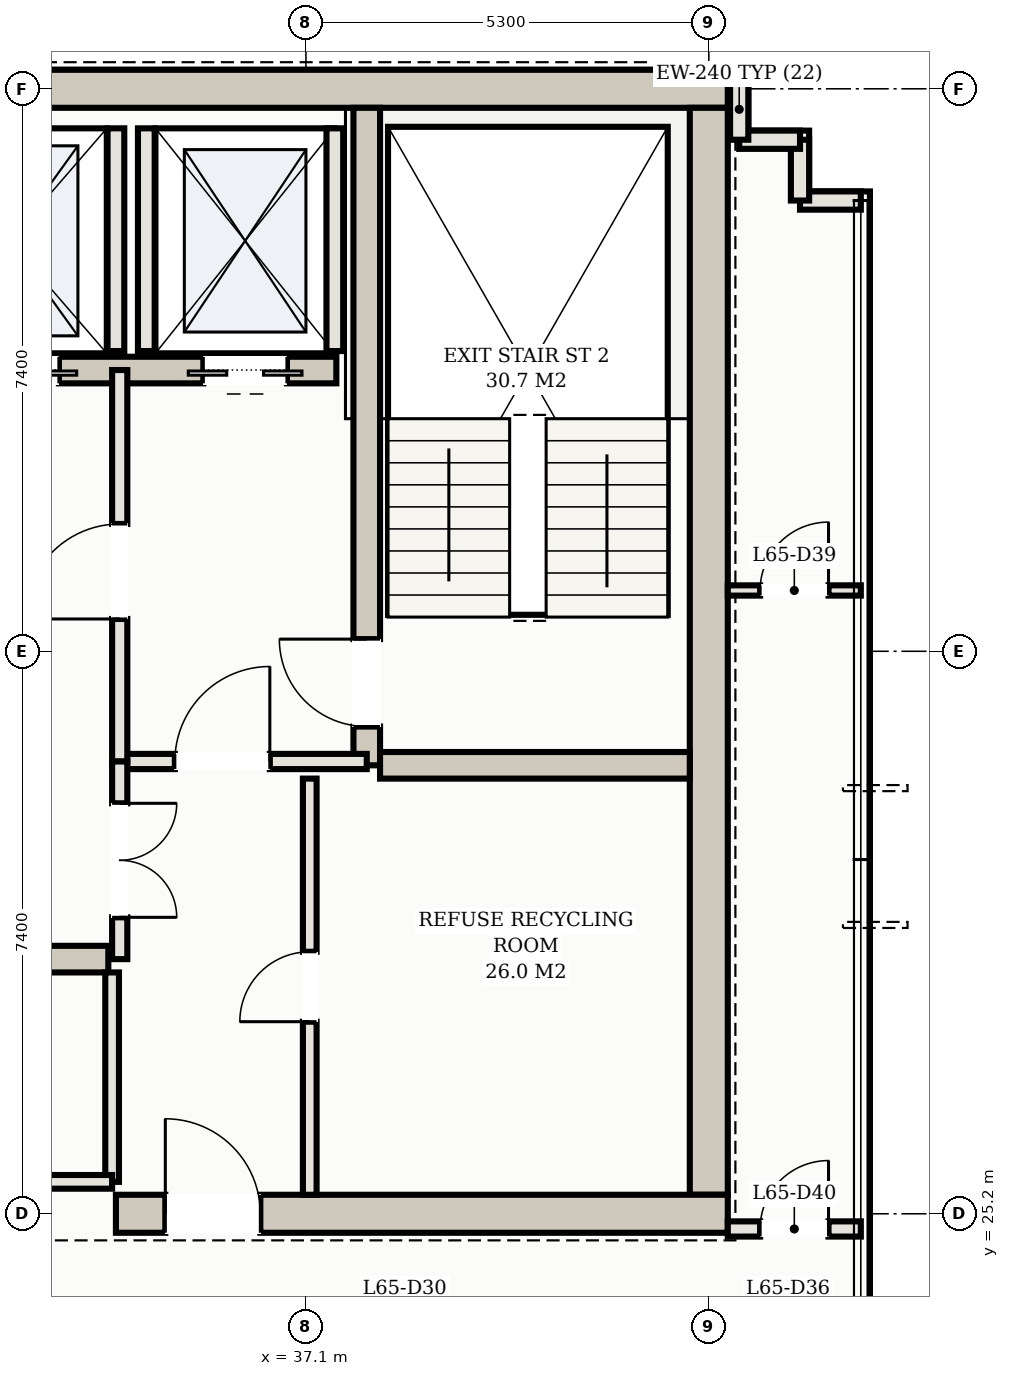
"""IFC4 building model, lengths in metres.
Left out: names, types, materials, properties, quantities, classifications, styles, units other than length and angle.
Written with IfcOpenShell. Run it as: python <this file> out.ifc"""

import sys

from ifc_helpers import new_model, si_unit, direction, frame, frame_2d, origin, place, context, subcontext, project, spatial, rectangle, extrude, element, fill, save


model = new_model("IFC4")
c1 = context("Model", 3, precision=1e-05, world=origin(), true_north=direction((0.0, 1.0)))
c2 = subcontext(c1, "Body", "Model", "MODEL_VIEW")
j1 = project(units=[si_unit("LENGTHUNIT", "METRE"), si_unit("PLANEANGLEUNIT", "RADIAN")], contexts=[c1])
p1 = place(None, origin())
s1 = spatial("IfcSite", under=j1, at=p1, CompositionType="ELEMENT")
p2 = place(p1, origin())
s2 = spatial("IfcBuilding", under=s1, at=p2, CompositionType="ELEMENT")
p3 = place(p2, frame((0.0, 0.0, 236.3)))
s3 = spatial("IfcBuildingStorey", under=s2, at=p3, CompositionType="ELEMENT", Elevation=236.3)
p4 = place(p3, frame((10.35, 40.0, 0.0), z_axis=(0.0, 0.0, 1.0), x_axis=(1.0, 0.0, 0.0)))
e1 = element("IfcWall", 1, at=p4, inside=s3, PredefinedType="SHEAR", context=c2, shape_type="SweptSolid", body=[
    extrude(rectangle(XDim=32.3, YDim=0.5, at=frame_2d((16.15, 0.0))), origin(), (0.0, 0.0, 1.0), 3.11),
])
p5 = place(p3, frame((42.4, 25.45, 0.0), z_axis=(0.0, 0.0, 1.0), x_axis=(0.0, 1.0, 0.0)))
e2 = element("IfcWall", 2, at=p5, inside=s3, PredefinedType="SHEAR", context=c2, shape_type="SweptSolid", body=[
    extrude(rectangle(XDim=14.3, YDim=0.5, at=frame_2d((7.15, 0.0))), origin(), (0.0, 0.0, 1.0), 3.11),
])
p6 = place(p3, frame((34.6, 25.2, 0.0), z_axis=(0.0, 0.0, 1.0), x_axis=(1.0, 0.0, 0.0)))
e3 = element("IfcWall", 3, at=p6, inside=s3, PredefinedType="SHEAR", context=c2, shape_type="SweptSolid", body=[
    extrude(rectangle(XDim=8.05, YDim=0.5, at=frame_2d((4.025, 0.0))), origin(), (0.0, 0.0, 1.0), 3.11),
])
p7 = place(p6, frame((0.65, 0.0, 0.0)))
e4 = element("IfcOpeningElement", 4, at=p7, cuts=e3, PredefinedType="OPENING", context=c2, shape_type="SweptSolid", body=[
    extrude(rectangle(XDim=1.25, YDim=2.2, at=frame_2d((0.625, 1.1))), frame((0.0, 0.26, 0.0), z_axis=(0.0, -1.0, 0.0), x_axis=(1.0, 0.0, 0.0)), (0.0, 0.0, 1.0), 0.52),
])
p8 = place(p3, frame((37.9, 31.1, 0.0), z_axis=(0.0, 0.0, 1.0), x_axis=(0.0, 1.0, 0.0)))
e5 = element("IfcWall", 5, at=p8, inside=s3, PredefinedType="SHEAR", context=c2, shape_type="SweptSolid", body=[
    extrude(rectangle(XDim=8.65, YDim=0.35, at=frame_2d((4.325, 0.0))), origin(), (0.0, 0.0, 1.0), 3.11),
])
p9 = place(p8, frame((0.51, 0.0, 0.0)))
e6 = element("IfcOpeningElement", 6, at=p9, cuts=e5, PredefinedType="OPENING", context=c2, shape_type="SweptSolid", body=[
    extrude(rectangle(XDim=1.15, YDim=2.2, at=frame_2d((0.575, 1.1))), frame((0.0, 0.185, 0.0), z_axis=(0.0, -1.0, 0.0), x_axis=(1.0, 0.0, 0.0)), (0.0, 0.0, 1.0), 0.37),
])
p10 = place(p3, frame((38.075, 31.1, 0.0), z_axis=(0.0, 0.0, 1.0), x_axis=(1.0, 0.0, 0.0)))
e7 = element("IfcWall", 7, at=p10, inside=s3, PredefinedType="SHEAR", context=c2, shape_type="SweptSolid", body=[
    extrude(rectangle(XDim=4.075, YDim=0.35, at=frame_2d((2.038, 0.0))), origin(), (0.0, 0.0, 1.0), 3.11),
])
p11 = place(p3, frame((15.5, 36.3, 0.0), z_axis=(0.0, 0.0, 1.0), x_axis=(1.0, 0.0, 0.0)))
e8 = element("IfcWall", 8, at=p11, inside=s3, PredefinedType="SHEAR", context=c2, shape_type="SweptSolid", body=[
    extrude(rectangle(XDim=22.0, YDim=0.35, at=frame_2d((11.0, 0.0))), origin(), (0.0, 0.0, 1.0), 3.11),
])
p12 = place(p11, frame((0.65, 0.0, 0.0)))
e9 = element("IfcOpeningElement", 9, at=p12, cuts=e8, PredefinedType="OPENING", context=c2, shape_type="SweptSolid", body=[
    extrude(rectangle(XDim=1.1, YDim=2.15, at=frame_2d((0.55, 1.075))), frame((0.0, 0.185, 0.0), z_axis=(0.0, -1.0, 0.0), x_axis=(1.0, 0.0, 0.0)), (0.0, 0.0, 1.0), 0.37),
])
p13 = place(p11, frame((20.25, 0.0, 0.0)))
e10 = element("IfcOpeningElement", 10, at=p13, cuts=e8, PredefinedType="OPENING", context=c2, shape_type="SweptSolid", body=[
    extrude(rectangle(XDim=1.1, YDim=2.15, at=frame_2d((0.55, 1.075))), frame((0.0, 0.185, 0.0), z_axis=(0.0, -1.0, 0.0), x_axis=(1.0, 0.0, 0.0)), (0.0, 0.0, 1.0), 0.37),
])
p14 = place(p11, frame((17.05, 0.0, 0.0)))
e11 = element("IfcOpeningElement", 11, at=p14, cuts=e8, PredefinedType="OPENING", context=c2, shape_type="SweptSolid", body=[
    extrude(rectangle(XDim=1.3, YDim=2.2, at=frame_2d((0.65, 1.1))), frame((0.0, 0.185, 0.0), z_axis=(0.0, -1.0, 0.0), x_axis=(1.0, 0.0, 0.0)), (0.0, 0.0, 1.0), 0.37),
])
p15 = place(p11, frame((3.95, 0.0, 0.0)))
e12 = element("IfcOpeningElement", 12, at=p15, cuts=e8, PredefinedType="OPENING", context=c2, shape_type="SweptSolid", body=[
    extrude(rectangle(XDim=1.1, YDim=2.15, at=frame_2d((0.55, 1.075))), frame((0.0, 0.185, 0.0), z_axis=(0.0, -1.0, 0.0), x_axis=(1.0, 0.0, 0.0)), (0.0, 0.0, 1.0), 0.37),
])
p16 = place(p11, frame((6.55, 0.0, 0.0)))
e13 = element("IfcOpeningElement", 13, at=p16, cuts=e8, PredefinedType="OPENING", context=c2, shape_type="SweptSolid", body=[
    extrude(rectangle(XDim=1.1, YDim=2.15, at=frame_2d((0.55, 1.075))), frame((0.0, 0.185, 0.0), z_axis=(0.0, -1.0, 0.0), x_axis=(1.0, 0.0, 0.0)), (0.0, 0.0, 1.0), 0.37),
])
p17 = place(p11, frame((9.15, 0.0, 0.0)))
e14 = element("IfcOpeningElement", 14, at=p17, cuts=e8, PredefinedType="OPENING", context=c2, shape_type="SweptSolid", body=[
    extrude(rectangle(XDim=1.1, YDim=2.15, at=frame_2d((0.55, 1.075))), frame((0.0, 0.185, 0.0), z_axis=(0.0, -1.0, 0.0), x_axis=(1.0, 0.0, 0.0)), (0.0, 0.0, 1.0), 0.37),
])
p18 = place(p3, frame((18.5, 28.55, 0.0), z_axis=(0.0, 0.0, 1.0), x_axis=(1.0, 0.0, 0.0)))
e15 = element("IfcWall", 15, at=p18, inside=s3, PredefinedType="SHEAR", context=c2, shape_type="SweptSolid", body=[
    extrude(rectangle(XDim=16.0, YDim=0.35, at=frame_2d((8.0, 0.0))), origin(), (0.0, 0.0, 1.0), 3.11),
])
for number, where, z_axis, x_axis in (
    (16, (35.0, 36.55, 0.0), (0.0, 0.0, 1.0), (0.0, 1.0, 0.0)),
    (17, (37.48, 36.55, 0.0), (0.0, 0.0, 1.0), (0.0, 1.0, 0.0)),
    (18, (34.6, 36.55, 0.0), (0.0, 0.0, 1.0), (0.0, 1.0, 0.0)),
):
    element("IfcWall", number, at=place(p3, frame(where, z_axis=z_axis, x_axis=x_axis)), inside=s3, PredefinedType="SOLIDWALL", context=c2, shape_type="SweptSolid", body=[
        extrude(rectangle(XDim=2.93, YDim=0.22, at=frame_2d((1.465, 0.0))), origin(), (0.0, 0.0, 1.0), 3.11),
    ])
p19 = place(p3, frame((44.4, 38.53, 0.0), z_axis=(0.0, 0.0, 1.0), x_axis=(-1.0, 0.0, 0.0)))
e19 = element("IfcWall", 19, at=p19, inside=s3, PredefinedType="SOLIDWALL", context=c2, shape_type="SweptSolid", body=[
    extrude(rectangle(XDim=0.8, YDim=0.24, at=frame_2d((0.4, 0.0))), origin(), (0.0, 0.0, 1.0), 3.11),
])
for number, where, z_axis, x_axis in (
    (20, (43.6, 38.53, 0.0), (0.0, 0.0, 1.0), (0.0, 1.0, 0.0)),
    (21, (43.6, 39.33, 0.0), (0.0, 0.0, 1.0), (-1.0, 0.0, 0.0)),
):
    element("IfcWall", number, at=place(p3, frame(where, z_axis=z_axis, x_axis=x_axis)), inside=s3, PredefinedType="SOLIDWALL", context=c2, shape_type="SweptSolid", body=[
        extrude(rectangle(XDim=0.8, YDim=0.24, at=frame_2d((0.4, 0.0))), origin(), (0.0, 0.0, 1.0), 3.11),
    ])
p20 = place(p3, frame((42.8, 39.33, 0.0), z_axis=(0.0, 0.0, 1.0), x_axis=(0.0, 1.0, 0.0)))
e22 = element("IfcWall", 22, at=p20, inside=s3, PredefinedType="SOLIDWALL", context=c2, shape_type="SweptSolid", body=[
    extrude(rectangle(XDim=0.8, YDim=0.24, at=frame_2d((0.4, 0.0))), origin(), (0.0, 0.0, 1.0), 3.11),
])
p21 = place(p3, frame((34.65, 31.15, 0.0), z_axis=(0.0, 0.0, 1.0), x_axis=(1.0, 0.0, 0.0)))
e23 = element("IfcWall", 23, at=p21, inside=s3, PredefinedType="PARTITIONING", context=c2, shape_type="SweptSolid", body=[
    extrude(rectangle(XDim=3.25, YDim=0.2, at=frame_2d((1.625, 0.0))), origin(), (0.0, 0.0, 1.0), 2.45),
])
p22 = place(p21, frame((0.725, 0.0, 0.0)))
e24 = element("IfcOpeningElement", 24, at=p22, cuts=e23, PredefinedType="OPENING", context=c2, shape_type="SweptSolid", body=[
    extrude(rectangle(XDim=1.25, YDim=2.2, at=frame_2d((0.625, 1.1))), frame((0.0, 0.11, 0.0), z_axis=(0.0, -1.0, 0.0), x_axis=(1.0, 0.0, 0.0)), (0.0, 0.0, 1.0), 0.22),
])
p23 = place(p3, frame((34.65, 31.15, 0.0), z_axis=(0.0, 0.0, 1.0), x_axis=(0.0, 1.0, 0.0)))
e25 = element("IfcWall", 25, at=p23, inside=s3, PredefinedType="PARTITIONING", context=c2, shape_type="SweptSolid", body=[
    extrude(rectangle(XDim=5.15, YDim=0.2, at=frame_2d((2.575, 0.0))), origin(), (0.0, 0.0, 1.0), 2.45),
])
p24 = place(p23, frame((1.875, 0.0, 0.0)))
e26 = element("IfcOpeningElement", 26, at=p24, cuts=e25, PredefinedType="OPENING", context=c2, shape_type="SweptSolid", body=[
    extrude(rectangle(XDim=1.25, YDim=2.2, at=frame_2d((0.625, 1.1))), frame((0.0, 0.11, 0.0), z_axis=(0.0, -1.0, 0.0), x_axis=(1.0, 0.0, 0.0)), (0.0, 0.0, 1.0), 0.22),
])
p25 = place(p3, frame((37.15, 25.45, 0.0), z_axis=(0.0, 0.0, 1.0), x_axis=(0.0, 1.0, 0.0)))
e27 = element("IfcWall", 27, at=p25, inside=s3, PredefinedType="PARTITIONING", context=c2, shape_type="SweptSolid", body=[
    extrude(rectangle(XDim=5.475, YDim=0.18, at=frame_2d((2.738, 0.0))), origin(), (0.0, 0.0, 1.0), 2.45),
])
p26 = place(p25, frame((2.277, 0.0, 0.0)))
e28 = element("IfcOpeningElement", 28, at=p26, cuts=e27, PredefinedType="OPENING", context=c2, shape_type="SweptSolid", body=[
    extrude(rectangle(XDim=0.92, YDim=2.15, at=frame_2d((0.46, 1.075))), frame((0.0, 0.1, 0.0), z_axis=(0.0, -1.0, 0.0), x_axis=(1.0, 0.0, 0.0)), (0.0, 0.0, 1.0), 0.2),
])
p27 = place(p3, frame((34.65, 28.55, 0.0), z_axis=(0.0, 0.0, 1.0), x_axis=(0.0, 1.0, 0.0)))
e29 = element("IfcWall", 29, at=p27, inside=s3, PredefinedType="PARTITIONING", context=c2, shape_type="SweptSolid", body=[
    extrude(rectangle(XDim=2.6, YDim=0.2, at=frame_2d((1.3, 0.0))), origin(), (0.0, 0.0, 1.0), 2.45),
])
p28 = place(p27, frame((0.55, 0.0, 0.0)))
e30 = element("IfcOpeningElement", 30, at=p28, cuts=e29, PredefinedType="OPENING", context=c2, shape_type="SweptSolid", body=[
    extrude(rectangle(XDim=1.5, YDim=2.25, at=frame_2d((0.75, 1.125))), frame((0.0, 0.11, 0.0), z_axis=(0.0, -1.0, 0.0), x_axis=(1.0, 0.0, 0.0)), (0.0, 0.0, 1.0), 0.22),
])
p29 = place(p3, frame((34.55, 25.62, 0.0), z_axis=(0.0, 0.0, 1.0), x_axis=(0.0, 1.0, 0.0)))
e31 = element("IfcWall", 31, at=p29, inside=s3, PredefinedType="PARTITIONING", context=c2, shape_type="SweptSolid", body=[
    extrude(rectangle(XDim=2.755, YDim=0.18, at=frame_2d((1.377, 0.0))), origin(), (0.0, 0.0, 1.0), 2.45),
])
p30 = place(p3, frame((26.65, 25.62, 0.0), z_axis=(0.0, 0.0, 1.0), x_axis=(1.0, 0.0, 0.0)))
e32 = element("IfcWall", 32, at=p30, inside=s3, PredefinedType="PARTITIONING", context=c2, shape_type="SweptSolid", body=[
    extrude(rectangle(XDim=7.9, YDim=0.18, at=frame_2d((3.95, 0.0))), origin(), (0.0, 0.0, 1.0), 2.45),
])
p31 = place(p30, frame((3.34, 0.0, 0.0)))
e33 = element("IfcOpeningElement", 33, at=p31, cuts=e32, PredefinedType="OPENING", context=c2, shape_type="SweptSolid", body=[
    extrude(rectangle(XDim=0.92, YDim=2.15, at=frame_2d((0.46, 1.075))), frame((0.0, 0.1, 0.0), z_axis=(0.0, -1.0, 0.0), x_axis=(1.0, 0.0, 0.0)), (0.0, 0.0, 1.0), 0.2),
])
p32 = place(p3, frame((42.65, 25.0, 0.0), z_axis=(0.0, 0.0, 1.0), x_axis=(1.0, 0.0, 0.0)))
e34 = element("IfcWall", 34, at=p32, inside=s3, PredefinedType="PARTITIONING", context=c2, shape_type="SweptSolid", body=[
    extrude(rectangle(XDim=1.75, YDim=0.2, at=frame_2d((0.875, 0.0))), origin(), (0.0, 0.0, 1.0), 2.45),
])
p33 = place(p32, frame((0.425, 0.0, 0.0)))
e35 = element("IfcOpeningElement", 35, at=p33, cuts=e34, PredefinedType="OPENING", context=c2, shape_type="SweptSolid", body=[
    extrude(rectangle(XDim=0.9, YDim=2.15, at=frame_2d((0.45, 1.075))), frame((0.0, 0.11, 0.0), z_axis=(0.0, -1.0, 0.0), x_axis=(1.0, 0.0, 0.0)), (0.0, 0.0, 1.0), 0.22),
])
p34 = place(p3, frame((42.65, 33.4, 0.0), z_axis=(0.0, 0.0, 1.0), x_axis=(1.0, 0.0, 0.0)))
e36 = element("IfcWall", 36, at=p34, inside=s3, PredefinedType="PARTITIONING", context=c2, shape_type="SweptSolid", body=[
    extrude(rectangle(XDim=1.75, YDim=0.135, at=frame_2d((0.875, 0.0))), origin(), (0.0, 0.0, 1.0), 2.45),
])
p35 = place(p34, frame((0.425, 0.0, 0.0)))
e37 = element("IfcOpeningElement", 37, at=p35, cuts=e36, PredefinedType="OPENING", context=c2, shape_type="SweptSolid", body=[
    extrude(rectangle(XDim=0.9, YDim=2.15, at=frame_2d((0.45, 1.075))), frame((0.0, 0.078, 0.0), z_axis=(0.0, -1.0, 0.0), x_axis=(1.0, 0.0, 0.0)), (0.0, 0.0, 1.0), 0.155),
])
p36 = place(p13, frame((1.1, 0.0, 0.0), z_axis=(0.0, 0.0, 1.0), x_axis=(-1.0, 0.0, 0.0)))
e38 = element("IfcDoor", 38, at=p36, inside=s3, OperationType="DOUBLE_DOOR_SLIDING", PredefinedType="DOOR", context=c2, shape_type="SweptSolid", body=[
    extrude(rectangle(XDim=1.1, YDim=2.15, at=frame_2d((0.55, 1.075))), frame((0.0, 0.025, 0.0), z_axis=(0.0, -1.0, 0.0), x_axis=(1.0, 0.0, 0.0)), (0.0, 0.0, 1.0), 0.05),
])
fill(e10, e38)
p37 = place(p14, frame((1.3, 0.0, 0.0), z_axis=(0.0, 0.0, 1.0), x_axis=(-1.0, 0.0, 0.0)))
e39 = element("IfcDoor", 39, at=p37, inside=s3, OperationType="DOUBLE_DOOR_SLIDING", PredefinedType="DOOR", context=c2, shape_type="SweptSolid", body=[
    extrude(rectangle(XDim=1.3, YDim=2.2, at=frame_2d((0.65, 1.1))), frame((0.0, 0.025, 0.0), z_axis=(0.0, -1.0, 0.0), x_axis=(1.0, 0.0, 0.0)), (0.0, 0.0, 1.0), 0.05),
])
fill(e11, e39)
p38 = place(p7, origin())
e40 = element("IfcDoor", 40, at=p38, inside=s3, OperationType="SINGLE_SWING_LEFT", PredefinedType="DOOR", context=c2, shape_type="SweptSolid", body=[
    extrude(rectangle(XDim=1.25, YDim=2.2, at=frame_2d((0.625, 1.1))), frame((0.0, 0.025, 0.0), z_axis=(0.0, -1.0, 0.0), x_axis=(1.0, 0.0, 0.0)), (0.0, 0.0, 1.0), 0.05),
])
fill(e4, e40)
p39 = place(p22, origin())
e41 = element("IfcDoor", 41, at=p39, inside=s3, OperationType="SINGLE_SWING_RIGHT", PredefinedType="DOOR", context=c2, shape_type="SweptSolid", body=[
    extrude(rectangle(XDim=1.25, YDim=2.2, at=frame_2d((0.625, 1.1))), frame((0.0, 0.025, 0.0), z_axis=(0.0, -1.0, 0.0), x_axis=(1.0, 0.0, 0.0)), (0.0, 0.0, 1.0), 0.05),
])
fill(e24, e41)
p40 = place(p24, origin())
e42 = element("IfcDoor", 42, at=p40, inside=s3, OperationType="SINGLE_SWING_LEFT", PredefinedType="DOOR", context=c2, shape_type="SweptSolid", body=[
    extrude(rectangle(XDim=1.25, YDim=2.2, at=frame_2d((0.625, 1.1))), frame((0.0, 0.025, 0.0), z_axis=(0.0, -1.0, 0.0), x_axis=(1.0, 0.0, 0.0)), (0.0, 0.0, 1.0), 0.05),
])
fill(e26, e42)
p41 = place(p9, origin())
e43 = element("IfcDoor", 43, at=p41, inside=s3, OperationType="SINGLE_SWING_RIGHT", PredefinedType="DOOR", context=c2, shape_type="SweptSolid", body=[
    extrude(rectangle(XDim=1.15, YDim=2.2, at=frame_2d((0.575, 1.1))), frame((0.0, 0.025, 0.0), z_axis=(0.0, -1.0, 0.0), x_axis=(1.0, 0.0, 0.0)), (0.0, 0.0, 1.0), 0.05),
])
fill(e6, e43)
p42 = place(p26, origin())
e44 = element("IfcDoor", 44, at=p42, inside=s3, OperationType="SINGLE_SWING_LEFT", PredefinedType="DOOR", context=c2, shape_type="SweptSolid", body=[
    extrude(rectangle(XDim=0.92, YDim=2.15, at=frame_2d((0.46, 1.075))), frame((0.0, 0.025, 0.0), z_axis=(0.0, -1.0, 0.0), x_axis=(1.0, 0.0, 0.0)), (0.0, 0.0, 1.0), 0.05),
])
fill(e28, e44)
p43 = place(p28, frame((1.5, 0.0, 0.0), z_axis=(0.0, 0.0, 1.0), x_axis=(-1.0, 0.0, 0.0)))
e45 = element("IfcDoor", 45, at=p43, inside=s3, OperationType="DOUBLE_DOOR_SINGLE_SWING", PredefinedType="DOOR", context=c2, shape_type="SweptSolid", body=[
    extrude(rectangle(XDim=1.5, YDim=2.25, at=frame_2d((0.75, 1.125))), frame((0.0, 0.025, 0.0), z_axis=(0.0, -1.0, 0.0), x_axis=(1.0, 0.0, 0.0)), (0.0, 0.0, 1.0), 0.05),
])
fill(e30, e45)
p44 = place(p35, origin())
e46 = element("IfcDoor", 46, at=p44, inside=s3, OperationType="SINGLE_SWING_RIGHT", PredefinedType="DOOR", context=c2, shape_type="SweptSolid", body=[
    extrude(rectangle(XDim=0.9, YDim=2.15, at=frame_2d((0.45, 1.075))), frame((0.0, 0.025, 0.0), z_axis=(0.0, -1.0, 0.0), x_axis=(1.0, 0.0, 0.0)), (0.0, 0.0, 1.0), 0.05),
])
fill(e37, e46)
p45 = place(p33, origin())
e47 = element("IfcDoor", 47, at=p45, inside=s3, OperationType="SINGLE_SWING_RIGHT", PredefinedType="DOOR", context=c2, shape_type="SweptSolid", body=[
    extrude(rectangle(XDim=0.9, YDim=2.15, at=frame_2d((0.45, 1.075))), frame((0.0, 0.025, 0.0), z_axis=(0.0, -1.0, 0.0), x_axis=(1.0, 0.0, 0.0)), (0.0, 0.0, 1.0), 0.05),
])
fill(e35, e47)
save(model, sys.argv[1])
